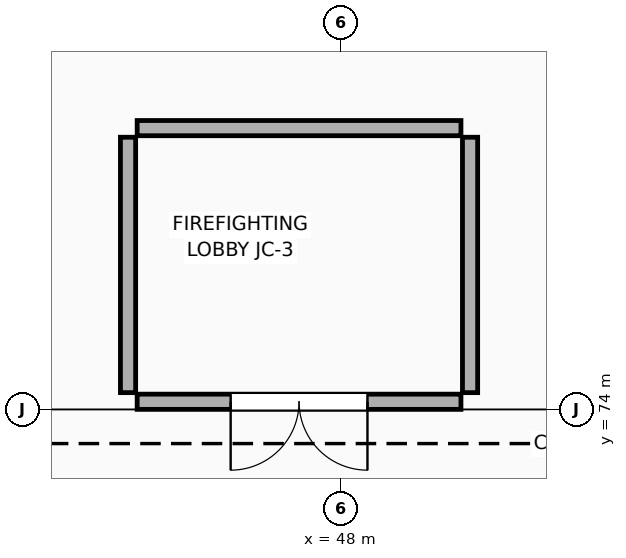
"""IFC4 building model, lengths in metres.
Left out: names, types, materials, properties, quantities, classifications, styles, units other than length and angle.
Written with IfcOpenShell. Run it as: python <this file> out.ifc"""

import sys

from ifc_helpers import new_model, si_unit, direction, frame, frame_2d, origin, place, context, subcontext, project, spatial, rectangle, extrude, element, fill, save


model = new_model("IFC4")
c1 = context("Model", 3, precision=1e-05, world=origin(), true_north=direction((0.0, 1.0)))
c2 = subcontext(c1, "Body", "Model", "MODEL_VIEW")
j1 = project(units=[si_unit("LENGTHUNIT", "METRE"), si_unit("PLANEANGLEUNIT", "RADIAN")], contexts=[c1])
p1 = place(None, origin())
s1 = spatial("IfcSite", under=j1, at=p1, CompositionType="ELEMENT")
p2 = place(p1, origin())
s2 = spatial("IfcBuilding", under=s1, at=p2, CompositionType="ELEMENT")
p3 = place(p2, origin())
s3 = spatial("IfcBuildingStorey", under=s2, at=p3, CompositionType="ELEMENT", Elevation=0.0)
p4 = place(p3, frame((45.2, 74.22, 0.0), z_axis=(0.0, 0.0, 1.0), x_axis=(0.0, 1.0, 0.0)))
e1 = element("IfcWall", 1, at=p4, inside=s3, PredefinedType="PARTITIONING", context=c2, shape_type="SweptSolid", body=[
    extrude(rectangle(XDim=3.36, YDim=0.2, at=frame_2d((1.68, 0.0))), origin(), (0.0, 0.0, 1.0), 5.11),
])
p5 = place(p3, frame((45.32, 77.7, 0.0), z_axis=(0.0, 0.0, 1.0), x_axis=(1.0, 0.0, 0.0)))
e2 = element("IfcWall", 2, at=p5, inside=s3, PredefinedType="PARTITIONING", context=c2, shape_type="SweptSolid", body=[
    extrude(rectangle(XDim=4.26, YDim=0.2, at=frame_2d((2.13, 0.0))), origin(), (0.0, 0.0, 1.0), 5.11),
])
p6 = place(p3, frame((49.7, 77.58, 0.0), z_axis=(0.0, 0.0, 1.0), x_axis=(0.0, -1.0, 0.0)))
e3 = element("IfcWall", 3, at=p6, inside=s3, PredefinedType="PARTITIONING", context=c2, shape_type="SweptSolid", body=[
    extrude(rectangle(XDim=3.36, YDim=0.2, at=frame_2d((1.68, 0.0))), origin(), (0.0, 0.0, 1.0), 5.11),
])
p7 = place(p3, frame((49.58, 74.1, 0.0), z_axis=(0.0, 0.0, 1.0), x_axis=(-1.0, 0.0, 0.0)))
e4 = element("IfcWall", 4, at=p7, inside=s3, PredefinedType="PARTITIONING", context=c2, shape_type="SweptSolid", body=[
    extrude(rectangle(XDim=4.26, YDim=0.2, at=frame_2d((2.13, 0.0))), origin(), (0.0, 0.0, 1.0), 5.11),
])
p8 = place(p7, frame((1.23, 0.0, 0.0)))
e5 = element("IfcOpeningElement", 5, at=p8, cuts=e4, PredefinedType="OPENING", context=c2, shape_type="SweptSolid", body=[
    extrude(rectangle(XDim=1.8, YDim=2.15, at=frame_2d((0.9, 1.075))), frame((0.0, 0.11, 0.0), z_axis=(0.0, -1.0, 0.0), x_axis=(1.0, 0.0, 0.0)), (0.0, 0.0, 1.0), 0.22),
])
p9 = place(p8, origin())
e6 = element("IfcDoor", 6, at=p9, inside=s3, OperationType="DOUBLE_DOOR_SINGLE_SWING", PredefinedType="DOOR", context=c2, shape_type="SweptSolid", body=[
    extrude(rectangle(XDim=1.8, YDim=2.15, at=frame_2d((0.9, 1.075))), frame((0.0, 0.025, 0.0), z_axis=(0.0, -1.0, 0.0), x_axis=(1.0, 0.0, 0.0)), (0.0, 0.0, 1.0), 0.05),
])
fill(e5, e6)
save(model, sys.argv[1])
